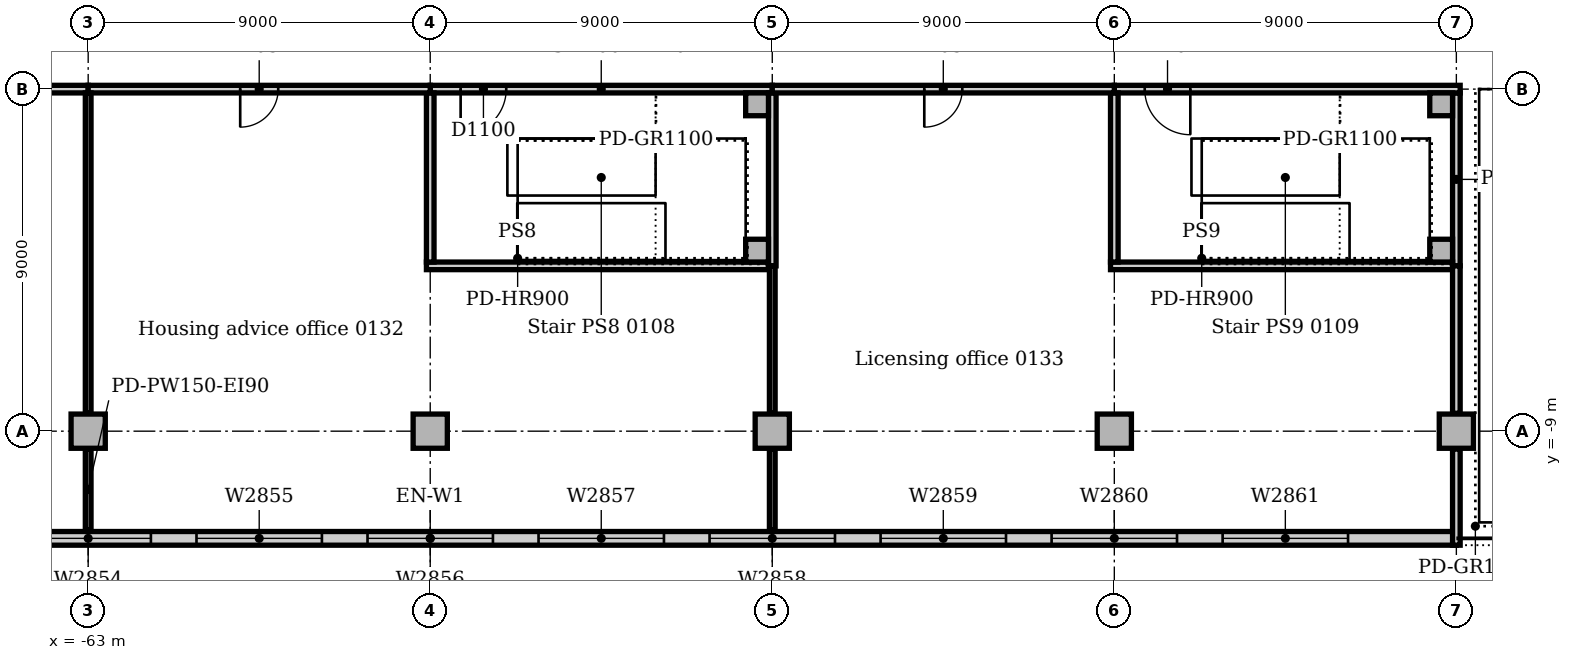
"""IFC4 building model, lengths in metres.
Left out: names, types, materials, properties, quantities, classifications, styles, units other than length and angle.
Written with IfcOpenShell. Run it as: python <this file> out.ifc"""

import sys

from ifc_helpers import new_model, si_unit, direction, frame, frame_2d, origin, origin_2d, place, context, subcontext, project, spatial, rectangle, extrude, element, fill, save


model = new_model("IFC4")
c1 = context("Model", 3, precision=1e-05, world=origin(), true_north=direction((0.0, 1.0)))
c2 = subcontext(c1, "Body", "Model", "MODEL_VIEW")
j1 = project(units=[si_unit("LENGTHUNIT", "METRE"), si_unit("PLANEANGLEUNIT", "RADIAN")], contexts=[c1])
p1 = place(None, origin())
s1 = spatial("IfcSite", under=j1, at=p1, CompositionType="ELEMENT")
p2 = place(p1, origin())
s2 = spatial("IfcBuilding", under=s1, at=p2, CompositionType="ELEMENT")
p3 = place(p2, frame((0.0, 0.0, 6.0)))
s3 = spatial("IfcBuildingStorey", under=s2, at=p3, CompositionType="ELEMENT", Elevation=6.0)
for number, where, z_axis, x_axis in (
    (1, (-63.0, -9.0, 0.0), (0.0, 0.0, 1.0), (1.0, 0.0, 0.0)),
    (2, (-54.0, -9.0, 0.0), (0.0, 0.0, 1.0), (1.0, 0.0, 0.0)),
    (3, (-45.0, -9.0, 0.0), (0.0, 0.0, 1.0), (1.0, 0.0, 0.0)),
    (4, (-36.0, -9.0, 0.0), (0.0, 0.0, 1.0), (1.0, 0.0, 0.0)),
    (5, (-27.0, -9.0, 0.0), (0.0, 0.0, 1.0), (1.0, 0.0, 0.0)),
):
    element("IfcColumn", number, at=place(p3, frame(where, z_axis=z_axis, x_axis=x_axis)), inside=s3, PredefinedType="COLUMN", context=c2, shape_type="SweptSolid", body=[
        extrude(rectangle(XDim=0.9, YDim=0.9, at=origin_2d()), origin(), (0.0, 0.0, 1.0), 4.7),
    ])
p4 = place(p3, frame((-81.0, -11.82, 0.0), z_axis=(0.0, 0.0, 1.0), x_axis=(1.0, 0.0, 0.0)))
e6 = element("IfcWall", 6, at=p4, inside=s3, PredefinedType="STANDARD", context=c2, shape_type="SweptSolid", body=[
    extrude(rectangle(XDim=54.0, YDim=0.36, at=frame_2d((27.0, 0.0))), origin(), (0.0, 0.0, 1.0), 4.7),
])
p5 = place(p4, frame((2.85, 0.0, 0.9)))
e7 = element("IfcOpeningElement", 7, at=p5, cuts=e6, PredefinedType="OPENING", context=c2, shape_type="SweptSolid", body=[
    extrude(rectangle(XDim=3.3, YDim=2.4, at=frame_2d((1.65, 1.2))), frame((0.0, 0.19, 0.0), z_axis=(0.0, -1.0, 0.0), x_axis=(1.0, 0.0, 0.0)), (0.0, 0.0, 1.0), 0.38),
])
p6 = place(p4, frame((7.35, 0.0, 0.9)))
e8 = element("IfcOpeningElement", 8, at=p6, cuts=e6, PredefinedType="OPENING", context=c2, shape_type="SweptSolid", body=[
    extrude(rectangle(XDim=3.3, YDim=2.4, at=frame_2d((1.65, 1.2))), frame((0.0, 0.19, 0.0), z_axis=(0.0, -1.0, 0.0), x_axis=(1.0, 0.0, 0.0)), (0.0, 0.0, 1.0), 0.38),
])
p7 = place(p4, frame((11.85, 0.0, 0.9)))
e9 = element("IfcOpeningElement", 9, at=p7, cuts=e6, PredefinedType="OPENING", context=c2, shape_type="SweptSolid", body=[
    extrude(rectangle(XDim=3.3, YDim=2.4, at=frame_2d((1.65, 1.2))), frame((0.0, 0.19, 0.0), z_axis=(0.0, -1.0, 0.0), x_axis=(1.0, 0.0, 0.0)), (0.0, 0.0, 1.0), 0.38),
])
p8 = place(p4, frame((16.35, 0.0, 0.9)))
e10 = element("IfcOpeningElement", 10, at=p8, cuts=e6, PredefinedType="OPENING", context=c2, shape_type="SweptSolid", body=[
    extrude(rectangle(XDim=3.3, YDim=2.4, at=frame_2d((1.65, 1.2))), frame((0.0, 0.19, 0.0), z_axis=(0.0, -1.0, 0.0), x_axis=(1.0, 0.0, 0.0)), (0.0, 0.0, 1.0), 0.38),
])
p9 = place(p4, frame((20.85, 0.0, 0.9)))
e11 = element("IfcOpeningElement", 11, at=p9, cuts=e6, PredefinedType="OPENING", context=c2, shape_type="SweptSolid", body=[
    extrude(rectangle(XDim=3.3, YDim=2.4, at=frame_2d((1.65, 1.2))), frame((0.0, 0.19, 0.0), z_axis=(0.0, -1.0, 0.0), x_axis=(1.0, 0.0, 0.0)), (0.0, 0.0, 1.0), 0.38),
])
p10 = place(p4, frame((25.35, 0.0, 0.9)))
e12 = element("IfcOpeningElement", 12, at=p10, cuts=e6, PredefinedType="OPENING", context=c2, shape_type="SweptSolid", body=[
    extrude(rectangle(XDim=3.3, YDim=2.4, at=frame_2d((1.65, 1.2))), frame((0.0, 0.19, 0.0), z_axis=(0.0, -1.0, 0.0), x_axis=(1.0, 0.0, 0.0)), (0.0, 0.0, 1.0), 0.38),
])
p11 = place(p4, frame((29.85, 0.0, 0.9)))
e13 = element("IfcOpeningElement", 13, at=p11, cuts=e6, PredefinedType="OPENING", context=c2, shape_type="SweptSolid", body=[
    extrude(rectangle(XDim=3.3, YDim=2.4, at=frame_2d((1.65, 1.2))), frame((0.0, 0.19, 0.0), z_axis=(0.0, -1.0, 0.0), x_axis=(1.0, 0.0, 0.0)), (0.0, 0.0, 1.0), 0.38),
])
p12 = place(p4, frame((34.35, 0.0, 0.9)))
e14 = element("IfcOpeningElement", 14, at=p12, cuts=e6, PredefinedType="OPENING", context=c2, shape_type="SweptSolid", body=[
    extrude(rectangle(XDim=3.3, YDim=2.4, at=frame_2d((1.65, 1.2))), frame((0.0, 0.19, 0.0), z_axis=(0.0, -1.0, 0.0), x_axis=(1.0, 0.0, 0.0)), (0.0, 0.0, 1.0), 0.38),
])
p13 = place(p4, frame((38.85, 0.0, 0.9)))
e15 = element("IfcOpeningElement", 15, at=p13, cuts=e6, PredefinedType="OPENING", context=c2, shape_type="SweptSolid", body=[
    extrude(rectangle(XDim=3.3, YDim=2.4, at=frame_2d((1.65, 1.2))), frame((0.0, 0.19, 0.0), z_axis=(0.0, -1.0, 0.0), x_axis=(1.0, 0.0, 0.0)), (0.0, 0.0, 1.0), 0.38),
])
p14 = place(p4, frame((43.35, 0.0, 0.9)))
e16 = element("IfcOpeningElement", 16, at=p14, cuts=e6, PredefinedType="OPENING", context=c2, shape_type="SweptSolid", body=[
    extrude(rectangle(XDim=3.3, YDim=2.4, at=frame_2d((1.65, 1.2))), frame((0.0, 0.19, 0.0), z_axis=(0.0, -1.0, 0.0), x_axis=(1.0, 0.0, 0.0)), (0.0, 0.0, 1.0), 0.38),
])
p15 = place(p4, frame((47.85, 0.0, 0.9)))
e17 = element("IfcOpeningElement", 17, at=p15, cuts=e6, PredefinedType="OPENING", context=c2, shape_type="SweptSolid", body=[
    extrude(rectangle(XDim=3.3, YDim=2.4, at=frame_2d((1.65, 1.2))), frame((0.0, 0.19, 0.0), z_axis=(0.0, -1.0, 0.0), x_axis=(1.0, 0.0, 0.0)), (0.0, 0.0, 1.0), 0.38),
])
for number, where, z_axis, x_axis in (
    (18, (-45.4, -4.25, 0.0), (0.0, 0.0, 1.0), (1.0, 0.0, 0.0)),
    (19, (-45.4, -0.4, 0.0), (0.0, 0.0, 1.0), (1.0, 0.0, 0.0)),
    (20, (-27.4, -4.25, 0.0), (0.0, 0.0, 1.0), (1.0, 0.0, 0.0)),
    (21, (-27.4, -0.4, 0.0), (0.0, 0.0, 1.0), (1.0, 0.0, 0.0)),
):
    element("IfcColumn", number, at=place(p3, frame(where, z_axis=z_axis, x_axis=x_axis)), inside=s3, PredefinedType="COLUMN", context=c2, shape_type="SweptSolid", body=[
        extrude(rectangle(XDim=0.6, YDim=0.6, at=origin_2d()), origin(), (0.0, 0.0, 1.0), 5.0),
    ])
p16 = place(p3, frame((-54.0, 0.0, 0.0), z_axis=(0.0, 0.0, 1.0), x_axis=(1.0, 0.0, 0.0)))
e22 = element("IfcWall", 22, at=p16, inside=s3, PredefinedType="SOLIDWALL", context=c2, shape_type="SweptSolid", body=[
    extrude(rectangle(XDim=9.0, YDim=0.2, at=frame_2d((4.5, 0.0))), origin(), (0.0, 0.0, 1.0), 4.7),
])
p17 = place(p16, frame((0.8, 0.0, 0.0)))
e23 = element("IfcOpeningElement", 23, at=p17, cuts=e22, PredefinedType="OPENING", context=c2, shape_type="SweptSolid", body=[
    extrude(rectangle(XDim=1.2, YDim=2.1, at=frame_2d((0.6, 1.05))), frame((0.0, 0.11, 0.0), z_axis=(0.0, -1.0, 0.0), x_axis=(1.0, 0.0, 0.0)), (0.0, 0.0, 1.0), 0.22),
])
p18 = place(p3, frame((-54.1, -4.65, 0.0), z_axis=(0.0, 0.0, 1.0), x_axis=(1.0, 0.0, 0.0)))
e24 = element("IfcWall", 24, at=p18, inside=s3, PredefinedType="SOLIDWALL", context=c2, shape_type="SweptSolid", body=[
    extrude(rectangle(XDim=9.0, YDim=0.2, at=frame_2d((4.5, 0.0))), origin(), (0.0, 0.0, 1.0), 4.7),
])
p19 = place(p3, frame((-54.0, -4.55, 0.0), z_axis=(0.0, 0.0, 1.0), x_axis=(0.0, 1.0, 0.0)))
e25 = element("IfcWall", 25, at=p19, inside=s3, PredefinedType="SOLIDWALL", context=c2, shape_type="SweptSolid", body=[
    extrude(rectangle(XDim=4.45, YDim=0.2, at=frame_2d((2.225, 0.0))), origin(), (0.0, 0.0, 1.0), 4.7),
])
p20 = place(p3, frame((-45.0, -4.65, 0.0), z_axis=(0.0, 0.0, 1.0), x_axis=(0.0, 1.0, 0.0)))
e26 = element("IfcWall", 26, at=p20, inside=s3, PredefinedType="SOLIDWALL", context=c2, shape_type="SweptSolid", body=[
    extrude(rectangle(XDim=4.55, YDim=0.2, at=frame_2d((2.275, 0.0))), origin(), (0.0, 0.0, 1.0), 4.7),
])
p21 = place(p3, frame((-27.0, -4.65, 0.0), z_axis=(0.0, 0.0, 1.0), x_axis=(0.0, 1.0, 0.0)))
e27 = element("IfcWall", 27, at=p21, inside=s3, PredefinedType="PARTITIONING", context=c2, shape_type="SweptSolid", body=[
    extrude(rectangle(XDim=4.55, YDim=0.2, at=frame_2d((2.275, 0.0))), origin(), (0.0, 0.0, 1.0), 4.7),
])
p22 = place(p3, frame((-36.0, 0.0, 0.0), z_axis=(0.0, 0.0, 1.0), x_axis=(1.0, 0.0, 0.0)))
e28 = element("IfcWall", 28, at=p22, inside=s3, PredefinedType="SOLIDWALL", context=c2, shape_type="SweptSolid", body=[
    extrude(rectangle(XDim=9.1, YDim=0.2, at=frame_2d((4.55, 0.0))), origin(), (0.0, 0.0, 1.0), 4.7),
])
p23 = place(p22, frame((0.8, 0.0, 0.0)))
e29 = element("IfcOpeningElement", 29, at=p23, cuts=e28, PredefinedType="OPENING", context=c2, shape_type="SweptSolid", body=[
    extrude(rectangle(XDim=1.2, YDim=2.1, at=frame_2d((0.6, 1.05))), frame((0.0, 0.11, 0.0), z_axis=(0.0, -1.0, 0.0), x_axis=(1.0, 0.0, 0.0)), (0.0, 0.0, 1.0), 0.22),
])
p24 = place(p3, frame((-36.1, -4.65, 0.0), z_axis=(0.0, 0.0, 1.0), x_axis=(1.0, 0.0, 0.0)))
e30 = element("IfcWall", 30, at=p24, inside=s3, PredefinedType="SOLIDWALL", context=c2, shape_type="SweptSolid", body=[
    extrude(rectangle(XDim=9.0, YDim=0.2, at=frame_2d((4.5, 0.0))), origin(), (0.0, 0.0, 1.0), 4.7),
])
p25 = place(p3, frame((-36.0, -4.55, 0.0), z_axis=(0.0, 0.0, 1.0), x_axis=(0.0, 1.0, 0.0)))
e31 = element("IfcWall", 31, at=p25, inside=s3, PredefinedType="SOLIDWALL", context=c2, shape_type="SweptSolid", body=[
    extrude(rectangle(XDim=4.45, YDim=0.2, at=frame_2d((2.225, 0.0))), origin(), (0.0, 0.0, 1.0), 4.7),
])
p26 = place(p3, frame((-27.0, -12.0, 0.0), z_axis=(0.0, 0.0, 1.0), x_axis=(0.0, 1.0, 0.0)))
e32 = element("IfcWall", 32, at=p26, inside=s3, PredefinedType="PARTITIONING", context=c2, shape_type="SweptSolid", body=[
    extrude(rectangle(XDim=2.53, YDim=0.2, at=frame_2d((1.265, 0.0))), origin(), (0.0, 0.0, 1.0), 4.7),
])
p27 = place(p3, frame((-27.0, -8.53, 0.0), z_axis=(0.0, 0.0, 1.0), x_axis=(0.0, 1.0, 0.0)))
e33 = element("IfcWall", 33, at=p27, inside=s3, PredefinedType="PARTITIONING", context=c2, shape_type="SweptSolid", body=[
    extrude(rectangle(XDim=3.88, YDim=0.2, at=frame_2d((1.94, 0.0))), origin(), (0.0, 0.0, 1.0), 4.7),
])
p28 = place(p3, frame((-71.53, 0.0, 0.0), z_axis=(0.0, 0.0, 1.0), x_axis=(1.0, 0.0, 0.0)))
e34 = element("IfcWall", 34, at=p28, inside=s3, PredefinedType="PARTITIONING", context=c2, shape_type="SweptSolid", body=[
    extrude(rectangle(XDim=8.53, YDim=0.2, at=frame_2d((4.265, 0.0))), origin(), (0.0, 0.0, 1.0), 4.7),
])
p29 = place(p28, frame((3.53, 0.0, 0.0)))
e35 = element("IfcOpeningElement", 35, at=p29, cuts=e34, PredefinedType="OPENING", context=c2, shape_type="SweptSolid", body=[
    extrude(rectangle(XDim=1.0, YDim=2.1, at=frame_2d((0.5, 1.05))), frame((0.0, 0.11, 0.0), z_axis=(0.0, -1.0, 0.0), x_axis=(1.0, 0.0, 0.0)), (0.0, 0.0, 1.0), 0.22),
])
p30 = place(p3, frame((-63.0, 0.0, 0.0), z_axis=(0.0, 0.0, 1.0), x_axis=(1.0, 0.0, 0.0)))
e36 = element("IfcWall", 36, at=p30, inside=s3, PredefinedType="PARTITIONING", context=c2, shape_type="SweptSolid", body=[
    extrude(rectangle(XDim=9.0, YDim=0.2, at=frame_2d((4.5, 0.0))), origin(), (0.0, 0.0, 1.0), 4.7),
])
p31 = place(p30, frame((4.0, 0.0, 0.0)))
e37 = element("IfcOpeningElement", 37, at=p31, cuts=e36, PredefinedType="OPENING", context=c2, shape_type="SweptSolid", body=[
    extrude(rectangle(XDim=1.0, YDim=2.1, at=frame_2d((0.5, 1.05))), frame((0.0, 0.11, 0.0), z_axis=(0.0, -1.0, 0.0), x_axis=(1.0, 0.0, 0.0)), (0.0, 0.0, 1.0), 0.22),
])
p32 = place(p3, frame((-45.0, 0.0, 0.0), z_axis=(0.0, 0.0, 1.0), x_axis=(1.0, 0.0, 0.0)))
e38 = element("IfcWall", 38, at=p32, inside=s3, PredefinedType="PARTITIONING", context=c2, shape_type="SweptSolid", body=[
    extrude(rectangle(XDim=9.0, YDim=0.2, at=frame_2d((4.5, 0.0))), origin(), (0.0, 0.0, 1.0), 4.7),
])
p33 = place(p32, frame((4.0, 0.0, 0.0)))
e39 = element("IfcOpeningElement", 39, at=p33, cuts=e38, PredefinedType="OPENING", context=c2, shape_type="SweptSolid", body=[
    extrude(rectangle(XDim=1.0, YDim=2.1, at=frame_2d((0.5, 1.05))), frame((0.0, 0.11, 0.0), z_axis=(0.0, -1.0, 0.0), x_axis=(1.0, 0.0, 0.0)), (0.0, 0.0, 1.0), 0.22),
])
p34 = place(p3, frame((-63.0, -11.6, 0.0), z_axis=(0.0, 0.0, 1.0), x_axis=(0.0, 1.0, 0.0)))
e40 = element("IfcWall", 40, at=p34, inside=s3, PredefinedType="PARTITIONING", context=c2, shape_type="SweptSolid", body=[
    extrude(rectangle(XDim=2.13, YDim=0.15, at=frame_2d((1.065, 0.0))), origin(), (0.0, 0.0, 1.0), 4.7),
])
p35 = place(p3, frame((-63.0, -8.53, 0.0), z_axis=(0.0, 0.0, 1.0), x_axis=(0.0, 1.0, 0.0)))
e41 = element("IfcWall", 41, at=p35, inside=s3, PredefinedType="PARTITIONING", context=c2, shape_type="SweptSolid", body=[
    extrude(rectangle(XDim=8.43, YDim=0.15, at=frame_2d((4.215, 0.0))), origin(), (0.0, 0.0, 1.0), 4.7),
])
p36 = place(p3, frame((-45.0, -11.6, 0.0), z_axis=(0.0, 0.0, 1.0), x_axis=(0.0, 1.0, 0.0)))
e42 = element("IfcWall", 42, at=p36, inside=s3, PredefinedType="PARTITIONING", context=c2, shape_type="SweptSolid", body=[
    extrude(rectangle(XDim=2.13, YDim=0.15, at=frame_2d((1.065, 0.0))), origin(), (0.0, 0.0, 1.0), 4.7),
])
p37 = place(p3, frame((-45.0, -8.53, 0.0), z_axis=(0.0, 0.0, 1.0), x_axis=(0.0, 1.0, 0.0)))
e43 = element("IfcWall", 43, at=p37, inside=s3, PredefinedType="PARTITIONING", context=c2, shape_type="SweptSolid", body=[
    extrude(rectangle(XDim=3.88, YDim=0.15, at=frame_2d((1.94, 0.0))), origin(), (0.0, 0.0, 1.0), 4.7),
])
p38 = place(p8, origin())
e44 = element("IfcWindow", 44, at=p38, inside=s3, PartitioningType="SINGLE_PANEL", PredefinedType="WINDOW", context=c2, shape_type="SweptSolid", body=[
    extrude(rectangle(XDim=3.3, YDim=2.4, at=frame_2d((1.65, 1.2))), frame((0.0, 0.13, 0.0), z_axis=(0.0, -1.0, 0.0), x_axis=(1.0, 0.0, 0.0)), (0.0, 0.0, 1.0), 0.06),
])
fill(e10, e44)
p39 = place(p9, origin())
e45 = element("IfcWindow", 45, at=p39, inside=s3, PartitioningType="SINGLE_PANEL", PredefinedType="WINDOW", context=c2, shape_type="SweptSolid", body=[
    extrude(rectangle(XDim=3.3, YDim=2.4, at=frame_2d((1.65, 1.2))), frame((0.0, 0.13, 0.0), z_axis=(0.0, -1.0, 0.0), x_axis=(1.0, 0.0, 0.0)), (0.0, 0.0, 1.0), 0.06),
])
fill(e11, e45)
p40 = place(p10, origin())
e46 = element("IfcWindow", 46, at=p40, inside=s3, PartitioningType="SINGLE_PANEL", PredefinedType="WINDOW", context=c2, shape_type="SweptSolid", body=[
    extrude(rectangle(XDim=3.3, YDim=2.4, at=frame_2d((1.65, 1.2))), frame((0.0, 0.13, 0.0), z_axis=(0.0, -1.0, 0.0), x_axis=(1.0, 0.0, 0.0)), (0.0, 0.0, 1.0), 0.06),
])
fill(e12, e46)
p41 = place(p11, origin())
e47 = element("IfcWindow", 47, at=p41, inside=s3, PartitioningType="SINGLE_PANEL", PredefinedType="WINDOW", context=c2, shape_type="SweptSolid", body=[
    extrude(rectangle(XDim=3.3, YDim=2.4, at=frame_2d((1.65, 1.2))), frame((0.0, 0.13, 0.0), z_axis=(0.0, -1.0, 0.0), x_axis=(1.0, 0.0, 0.0)), (0.0, 0.0, 1.0), 0.06),
])
fill(e13, e47)
p42 = place(p12, origin())
e48 = element("IfcWindow", 48, at=p42, inside=s3, PartitioningType="SINGLE_PANEL", PredefinedType="WINDOW", context=c2, shape_type="SweptSolid", body=[
    extrude(rectangle(XDim=3.3, YDim=2.4, at=frame_2d((1.65, 1.2))), frame((0.0, 0.13, 0.0), z_axis=(0.0, -1.0, 0.0), x_axis=(1.0, 0.0, 0.0)), (0.0, 0.0, 1.0), 0.06),
])
fill(e14, e48)
p43 = place(p13, origin())
e49 = element("IfcWindow", 49, at=p43, inside=s3, PartitioningType="SINGLE_PANEL", PredefinedType="WINDOW", context=c2, shape_type="SweptSolid", body=[
    extrude(rectangle(XDim=3.3, YDim=2.4, at=frame_2d((1.65, 1.2))), frame((0.0, 0.13, 0.0), z_axis=(0.0, -1.0, 0.0), x_axis=(1.0, 0.0, 0.0)), (0.0, 0.0, 1.0), 0.06),
])
fill(e15, e49)
p44 = place(p14, origin())
e50 = element("IfcWindow", 50, at=p44, inside=s3, PartitioningType="SINGLE_PANEL", PredefinedType="WINDOW", context=c2, shape_type="SweptSolid", body=[
    extrude(rectangle(XDim=3.3, YDim=2.4, at=frame_2d((1.65, 1.2))), frame((0.0, 0.13, 0.0), z_axis=(0.0, -1.0, 0.0), x_axis=(1.0, 0.0, 0.0)), (0.0, 0.0, 1.0), 0.06),
])
fill(e16, e50)
p45 = place(p15, origin())
e51 = element("IfcWindow", 51, at=p45, inside=s3, PartitioningType="SINGLE_PANEL", PredefinedType="WINDOW", context=c2, shape_type="SweptSolid", body=[
    extrude(rectangle(XDim=3.3, YDim=2.4, at=frame_2d((1.65, 1.2))), frame((0.0, 0.13, 0.0), z_axis=(0.0, -1.0, 0.0), x_axis=(1.0, 0.0, 0.0)), (0.0, 0.0, 1.0), 0.06),
])
fill(e17, e51)
p46 = place(p31, frame((1.0, 0.0, 0.0), z_axis=(0.0, 0.0, 1.0), x_axis=(-1.0, 0.0, 0.0)))
e52 = element("IfcDoor", 52, at=p46, inside=s3, OperationType="SINGLE_SWING_RIGHT", PredefinedType="DOOR", context=c2, shape_type="SweptSolid", body=[
    extrude(rectangle(XDim=1.0, YDim=2.1, at=frame_2d((0.5, 1.05))), frame((0.0, 0.025, 0.0), z_axis=(0.0, -1.0, 0.0), x_axis=(1.0, 0.0, 0.0)), (0.0, 0.0, 1.0), 0.05),
])
fill(e37, e52)
p47 = place(p33, frame((1.0, 0.0, 0.0), z_axis=(0.0, 0.0, 1.0), x_axis=(-1.0, 0.0, 0.0)))
e53 = element("IfcDoor", 53, at=p47, inside=s3, OperationType="SINGLE_SWING_RIGHT", PredefinedType="DOOR", context=c2, shape_type="SweptSolid", body=[
    extrude(rectangle(XDim=1.0, YDim=2.1, at=frame_2d((0.5, 1.05))), frame((0.0, 0.025, 0.0), z_axis=(0.0, -1.0, 0.0), x_axis=(1.0, 0.0, 0.0)), (0.0, 0.0, 1.0), 0.05),
])
fill(e39, e53)
p48 = place(p17, frame((1.2, 0.0, 0.0), z_axis=(0.0, 0.0, 1.0), x_axis=(-1.0, 0.0, 0.0)))
e54 = element("IfcDoor", 54, at=p48, inside=s3, OperationType="SINGLE_SWING_RIGHT", PredefinedType="DOOR", context=c2, shape_type="SweptSolid", body=[
    extrude(rectangle(XDim=1.2, YDim=2.1, at=frame_2d((0.6, 1.05))), frame((0.0, 0.025, 0.0), z_axis=(0.0, -1.0, 0.0), x_axis=(1.0, 0.0, 0.0)), (0.0, 0.0, 1.0), 0.05),
])
fill(e23, e54)
p49 = place(p23, frame((1.2, 0.0, 0.0), z_axis=(0.0, 0.0, 1.0), x_axis=(-1.0, 0.0, 0.0)))
e55 = element("IfcDoor", 55, at=p49, inside=s3, OperationType="SINGLE_SWING_LEFT", PredefinedType="DOOR", context=c2, shape_type="SweptSolid", body=[
    extrude(rectangle(XDim=1.2, YDim=2.1, at=frame_2d((0.6, 1.05))), frame((0.0, 0.025, 0.0), z_axis=(0.0, -1.0, 0.0), x_axis=(1.0, 0.0, 0.0)), (0.0, 0.0, 1.0), 0.05),
])
fill(e29, e55)
save(model, sys.argv[1])
